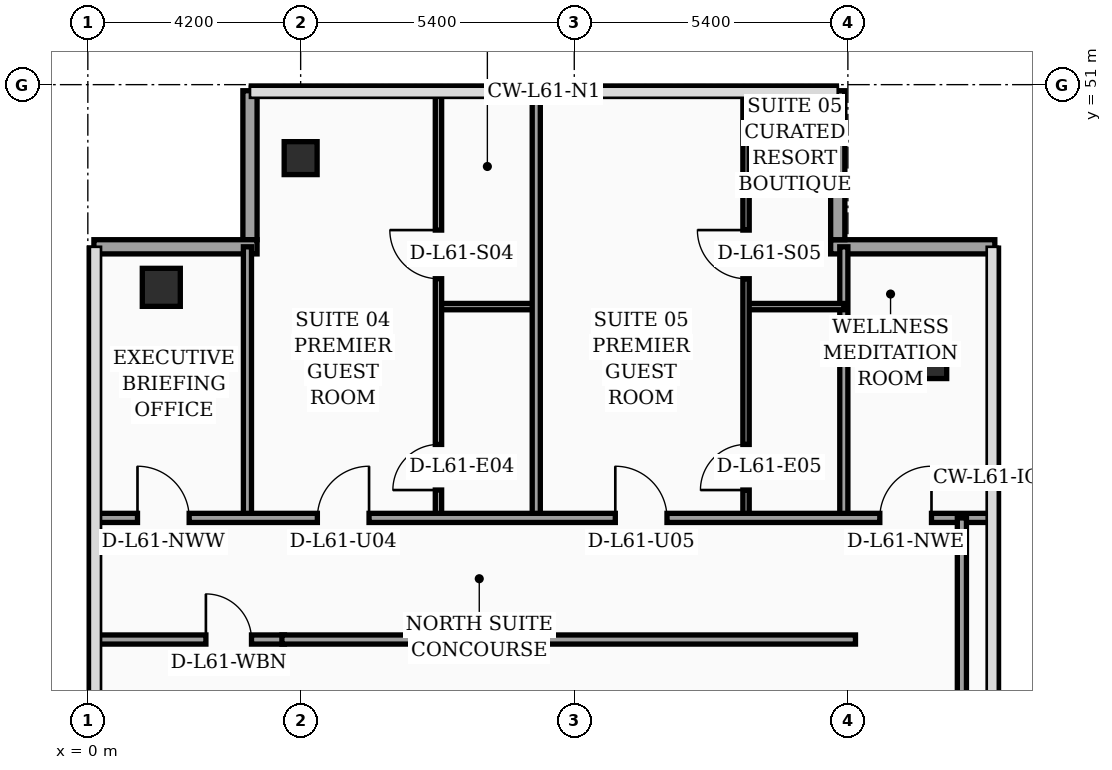
"""IFC4 building model, lengths in metres.
Left out: names, types, materials, properties, quantities, classifications, styles, units other than length and angle.
Written with IfcOpenShell. Run it as: python <this file> out.ifc"""

import sys

from ifc_helpers import new_model, si_unit, direction, frame, frame_2d, origin, origin_2d, place, context, subcontext, project, spatial, rectangle, hollow_rectangle, extrude, element, fill, save


model = new_model("IFC4")
c1 = context("Model", 3, precision=1e-05, world=origin(), true_north=direction((0.0, 1.0)))
c2 = subcontext(c1, "Body", "Model", "MODEL_VIEW")
j1 = project(units=[si_unit("LENGTHUNIT", "METRE"), si_unit("PLANEANGLEUNIT", "RADIAN")], contexts=[c1])
p1 = place(None, origin())
s1 = spatial("IfcSite", under=j1, at=p1, CompositionType="ELEMENT")
p2 = place(p1, origin())
s2 = spatial("IfcBuilding", under=s1, at=p2, CompositionType="ELEMENT")
p3 = place(p2, frame((0.0, 0.0, 247.6)))
s3 = spatial("IfcBuildingStorey", under=s2, at=p3, CompositionType="ELEMENT", Elevation=247.6)
p4 = place(p3, frame((1.45, 47.0, 0.0), z_axis=(0.0, 0.0, 1.0), x_axis=(1.0, 0.0, 0.0)))
e1 = element("IfcColumn", 1, at=p4, inside=s3, PredefinedType="COLUMN", context=c2, shape_type="SweptSolid", body=[
    extrude(hollow_rectangle(XDim=0.75, YDim=0.75, WallThickness=0.032, at=origin_2d()), origin(), (0.0, 0.0, 1.0), 3.56),
])
p5 = place(p3, frame((4.2, 49.55, 0.0), z_axis=(0.0, 0.0, 1.0), x_axis=(1.0, 0.0, 0.0)))
e2 = element("IfcColumn", 2, at=p5, inside=s3, PredefinedType="COLUMN", context=c2, shape_type="SweptSolid", body=[
    extrude(hollow_rectangle(XDim=0.65, YDim=0.65, WallThickness=0.028, at=origin_2d()), origin(), (0.0, 0.0, 1.0), 3.56),
])
p6 = place(p3, frame((16.55, 45.6, 0.0), z_axis=(0.0, 0.0, 1.0), x_axis=(1.0, 0.0, 0.0)))
e3 = element("IfcColumn", 3, at=p6, inside=s3, PredefinedType="COLUMN", context=c2, shape_type="SweptSolid", body=[
    extrude(rectangle(XDim=0.8, YDim=0.8, at=origin_2d()), origin(), (0.0, 0.0, 1.0), 3.56),
])
p7 = place(p3, frame((17.9, 47.8, 0.0), z_axis=(0.0, 0.0, 1.0), x_axis=(-1.0, 0.0, 0.0)))
e4 = element("IfcWall", 4, at=p7, inside=s3, PredefinedType="SOLIDWALL", context=c2, shape_type="SweptSolid", body=[
    extrude(rectangle(XDim=3.24, YDim=0.28, at=frame_2d((1.62, 0.0))), origin(), (0.0, 0.0, 1.0), 3.56),
])
p8 = place(p3, frame((14.8, 47.94, 0.0), z_axis=(0.0, 0.0, 1.0), x_axis=(0.0, 1.0, 0.0)))
e5 = element("IfcWall", 5, at=p8, inside=s3, PredefinedType="SOLIDWALL", context=c2, shape_type="SweptSolid", body=[
    extrude(rectangle(XDim=2.94, YDim=0.28, at=frame_2d((1.47, 0.0))), origin(), (0.0, 0.0, 1.0), 3.56),
])
p9 = place(p3, frame((3.2, 50.88, 0.0), z_axis=(0.0, 0.0, 1.0), x_axis=(0.0, -1.0, 0.0)))
e6 = element("IfcWall", 6, at=p9, inside=s3, PredefinedType="SOLIDWALL", context=c2, shape_type="SweptSolid", body=[
    extrude(rectangle(XDim=2.94, YDim=0.28, at=frame_2d((1.47, 0.0))), origin(), (0.0, 0.0, 1.0), 3.09),
])
p10 = place(p3, frame((3.34, 47.8, 0.0), z_axis=(0.0, 0.0, 1.0), x_axis=(-1.0, 0.0, 0.0)))
e7 = element("IfcWall", 7, at=p10, inside=s3, PredefinedType="SOLIDWALL", context=c2, shape_type="SweptSolid", body=[
    extrude(rectangle(XDim=3.22, YDim=0.28, at=frame_2d((1.61, 0.0))), origin(), (0.0, 0.0, 1.0), 3.09),
])
p11 = place(p3, frame((0.08, 40.05, 0.0), z_axis=(0.0, 0.0, 1.0), x_axis=(1.0, 0.0, 0.0)))
e8 = element("IfcWall", 8, at=p11, inside=s3, PredefinedType="PARTITIONING", context=c2, shape_type="SweptSolid", body=[
    extrude(rectangle(XDim=3.8, YDim=0.18, at=frame_2d((1.9, 0.0))), origin(), (0.0, 0.0, 1.0), 2.99),
])
p12 = place(p11, frame((2.25, 0.0, 0.0)))
e9 = element("IfcOpeningElement", 9, at=p12, cuts=e8, PredefinedType="OPENING", context=c2, shape_type="SweptSolid", body=[
    extrude(rectangle(XDim=0.9, YDim=2.15, at=frame_2d((0.45, 1.075))), frame((0.0, 0.1, 0.0), z_axis=(0.0, -1.0, 0.0), x_axis=(1.0, 0.0, 0.0)), (0.0, 0.0, 1.0), 0.2),
])
p13 = place(p3, frame((3.15, 42.45, 0.0), z_axis=(0.0, 0.0, 1.0), x_axis=(0.0, 1.0, 0.0)))
e10 = element("IfcWall", 10, at=p13, inside=s3, PredefinedType="PARTITIONING", context=c2, shape_type="SweptSolid", body=[
    extrude(rectangle(XDim=5.35, YDim=0.16, at=frame_2d((2.675, 0.0))), origin(), (0.0, 0.0, 1.0), 3.14),
])
p14 = place(p3, frame((14.92, 42.45, 0.0), z_axis=(0.0, 0.0, 1.0), x_axis=(0.0, 1.0, 0.0)))
e11 = element("IfcWall", 11, at=p14, inside=s3, PredefinedType="PARTITIONING", context=c2, shape_type="SweptSolid", body=[
    extrude(rectangle(XDim=5.35, YDim=0.16, at=frame_2d((2.675, 0.0))), origin(), (0.0, 0.0, 1.0), 3.09),
])
p15 = place(p3, frame((6.92, 46.62, 0.0), z_axis=(0.0, 0.0, 1.0), x_axis=(1.0, 0.0, 0.0)))
e12 = element("IfcWall", 12, at=p15, inside=s3, PredefinedType="PARTITIONING", context=c2, shape_type="SweptSolid", body=[
    extrude(rectangle(XDim=1.93, YDim=0.125, at=frame_2d((0.965, 0.0))), origin(), (0.0, 0.0, 1.0), 3.56),
])
p16 = place(p3, frame((6.92, 42.45, 0.0), z_axis=(0.0, 0.0, 1.0), x_axis=(0.0, 1.0, 0.0)))
e13 = element("IfcWall", 13, at=p16, inside=s3, PredefinedType="PARTITIONING", context=c2, shape_type="SweptSolid", body=[
    extrude(rectangle(XDim=8.49, YDim=0.125, at=frame_2d((4.245, 0.0))), origin(), (0.0, 0.0, 1.0), 3.09),
])
p17 = place(p16, frame((0.55, 0.0, 0.0)))
e14 = element("IfcOpeningElement", 14, at=p17, cuts=e13, PredefinedType="OPENING", context=c2, shape_type="SweptSolid", body=[
    extrude(rectangle(XDim=0.9, YDim=2.15, at=frame_2d((0.45, 1.075))), frame((0.0, 0.073, 0.0), z_axis=(0.0, -1.0, 0.0), x_axis=(1.0, 0.0, 0.0)), (0.0, 0.0, 1.0), 0.145),
])
p18 = place(p16, frame((4.72, 0.0, 0.0)))
e15 = element("IfcOpeningElement", 15, at=p18, cuts=e13, PredefinedType="OPENING", context=c2, shape_type="SweptSolid", body=[
    extrude(rectangle(XDim=0.96, YDim=2.2, at=frame_2d((0.48, 1.1))), frame((0.0, 0.073, 0.0), z_axis=(0.0, -1.0, 0.0), x_axis=(1.0, 0.0, 0.0)), (0.0, 0.0, 1.0), 0.145),
])
p19 = place(p3, frame((12.99, 46.62, 0.0), z_axis=(0.0, 0.0, 1.0), x_axis=(1.0, 0.0, 0.0)))
e16 = element("IfcWall", 16, at=p19, inside=s3, PredefinedType="PARTITIONING", context=c2, shape_type="SweptSolid", body=[
    extrude(rectangle(XDim=1.93, YDim=0.125, at=frame_2d((0.965, 0.0))), origin(), (0.0, 0.0, 1.0), 3.09),
])
p20 = place(p3, frame((12.99, 42.45, 0.0), z_axis=(0.0, 0.0, 1.0), x_axis=(0.0, 1.0, 0.0)))
e17 = element("IfcWall", 17, at=p20, inside=s3, PredefinedType="PARTITIONING", context=c2, shape_type="SweptSolid", body=[
    extrude(rectangle(XDim=8.49, YDim=0.125, at=frame_2d((4.245, 0.0))), origin(), (0.0, 0.0, 1.0), 3.09),
])
p21 = place(p20, frame((0.55, 0.0, 0.0)))
e18 = element("IfcOpeningElement", 18, at=p21, cuts=e17, PredefinedType="OPENING", context=c2, shape_type="SweptSolid", body=[
    extrude(rectangle(XDim=0.9, YDim=2.15, at=frame_2d((0.45, 1.075))), frame((0.0, 0.073, 0.0), z_axis=(0.0, -1.0, 0.0), x_axis=(1.0, 0.0, 0.0)), (0.0, 0.0, 1.0), 0.145),
])
p22 = place(p20, frame((4.72, 0.0, 0.0)))
e19 = element("IfcOpeningElement", 19, at=p22, cuts=e17, PredefinedType="OPENING", context=c2, shape_type="SweptSolid", body=[
    extrude(rectangle(XDim=0.96, YDim=2.2, at=frame_2d((0.48, 1.1))), frame((0.0, 0.073, 0.0), z_axis=(0.0, -1.0, 0.0), x_axis=(1.0, 0.0, 0.0)), (0.0, 0.0, 1.0), 0.145),
])
p23 = place(p3, frame((8.85, 42.45, 0.0), z_axis=(0.0, 0.0, 1.0), x_axis=(0.0, 1.0, 0.0)))
e20 = element("IfcWall", 20, at=p23, inside=s3, PredefinedType="PARTITIONING", context=c2, shape_type="SweptSolid", body=[
    extrude(rectangle(XDim=8.49, YDim=0.16, at=frame_2d((4.245, 0.0))), origin(), (0.0, 0.0, 1.0), 3.09),
])
p24 = place(p3, frame((0.08, 42.45, 0.0), z_axis=(0.0, 0.0, 1.0), x_axis=(1.0, 0.0, 0.0)))
e21 = element("IfcWall", 21, at=p24, inside=s3, PredefinedType="PARTITIONING", context=c2, shape_type="SweptSolid", body=[
    extrude(rectangle(XDim=17.77, YDim=0.18, at=frame_2d((8.885, 0.0))), origin(), (0.0, 0.0, 1.0), 2.99),
])
p25 = place(p24, frame((0.9, 0.0, 0.0)))
e22 = element("IfcOpeningElement", 22, at=p25, cuts=e21, PredefinedType="OPENING", context=c2, shape_type="SweptSolid", body=[
    extrude(rectangle(XDim=1.02, YDim=2.2, at=frame_2d((0.51, 1.1))), frame((0.0, 0.1, 0.0), z_axis=(0.0, -1.0, 0.0), x_axis=(1.0, 0.0, 0.0)), (0.0, 0.0, 1.0), 0.2),
])
p26 = place(p24, frame((4.45, 0.0, 0.0)))
e23 = element("IfcOpeningElement", 23, at=p26, cuts=e21, PredefinedType="OPENING", context=c2, shape_type="SweptSolid", body=[
    extrude(rectangle(XDim=1.02, YDim=2.2, at=frame_2d((0.51, 1.1))), frame((0.0, 0.1, 0.0), z_axis=(0.0, -1.0, 0.0), x_axis=(1.0, 0.0, 0.0)), (0.0, 0.0, 1.0), 0.2),
])
p27 = place(p24, frame((10.33, 0.0, 0.0)))
e24 = element("IfcOpeningElement", 24, at=p27, cuts=e21, PredefinedType="OPENING", context=c2, shape_type="SweptSolid", body=[
    extrude(rectangle(XDim=1.02, YDim=2.2, at=frame_2d((0.51, 1.1))), frame((0.0, 0.1, 0.0), z_axis=(0.0, -1.0, 0.0), x_axis=(1.0, 0.0, 0.0)), (0.0, 0.0, 1.0), 0.2),
])
p28 = place(p24, frame((15.55, 0.0, 0.0)))
e25 = element("IfcOpeningElement", 25, at=p28, cuts=e21, PredefinedType="OPENING", context=c2, shape_type="SweptSolid", body=[
    extrude(rectangle(XDim=1.02, YDim=2.2, at=frame_2d((0.51, 1.1))), frame((0.0, 0.1, 0.0), z_axis=(0.0, -1.0, 0.0), x_axis=(1.0, 0.0, 0.0)), (0.0, 0.0, 1.0), 0.2),
])
p29 = place(p3, frame((17.25, 24.3, 0.0), z_axis=(0.0, 0.0, 1.0), x_axis=(0.0, 1.0, 0.0)))
e26 = element("IfcWall", 26, at=p29, inside=s3, PredefinedType="PARTITIONING", context=c2, shape_type="SweptSolid", body=[
    extrude(rectangle(XDim=18.15, YDim=0.18, at=frame_2d((9.075, 0.0))), origin(), (0.0, 0.0, 1.0), 2.99),
])
p30 = place(p29, frame((3.2, 0.0, 0.0)))
e27 = element("IfcOpeningElement", 27, at=p30, cuts=e26, PredefinedType="OPENING", context=c2, shape_type="SweptSolid", body=[
    extrude(rectangle(XDim=1.02, YDim=2.2, at=frame_2d((0.51, 1.1))), frame((0.0, 0.1, 0.0), z_axis=(0.0, -1.0, 0.0), x_axis=(1.0, 0.0, 0.0)), (0.0, 0.0, 1.0), 0.2),
])
p31 = place(p3, frame((3.83, 40.05, 0.0), z_axis=(0.0, 0.0, 1.0), x_axis=(1.0, 0.0, 0.0)))
e28 = element("IfcWall", 28, at=p31, inside=s3, PredefinedType="PARTITIONING", context=c2, shape_type="SweptSolid", body=[
    extrude(rectangle(XDim=11.32, YDim=0.18, at=frame_2d((5.66, 0.0))), origin(), (0.0, 0.0, 1.0), 2.99),
])
p32 = place(p12, origin())
e29 = element("IfcDoor", 29, at=p32, inside=s3, OperationType="SINGLE_SWING_LEFT", PredefinedType="DOOR", context=c2, shape_type="SweptSolid", body=[
    extrude(rectangle(XDim=0.9, YDim=2.15, at=frame_2d((0.45, 1.075))), frame((0.0, 0.025, 0.0), z_axis=(0.0, -1.0, 0.0), x_axis=(1.0, 0.0, 0.0)), (0.0, 0.0, 1.0), 0.05),
])
fill(e9, e29)
p33 = place(p17, origin())
e30 = element("IfcDoor", 30, at=p33, inside=s3, OperationType="SINGLE_SWING_LEFT", PredefinedType="DOOR", context=c2, shape_type="SweptSolid", body=[
    extrude(rectangle(XDim=0.9, YDim=2.15, at=frame_2d((0.45, 1.075))), frame((0.0, 0.025, 0.0), z_axis=(0.0, -1.0, 0.0), x_axis=(1.0, 0.0, 0.0)), (0.0, 0.0, 1.0), 0.05),
])
fill(e14, e30)
p34 = place(p18, origin())
e31 = element("IfcDoor", 31, at=p34, inside=s3, OperationType="SINGLE_SWING_RIGHT", PredefinedType="DOOR", context=c2, shape_type="SweptSolid", body=[
    extrude(rectangle(XDim=0.96, YDim=2.2, at=frame_2d((0.48, 1.1))), frame((0.0, 0.025, 0.0), z_axis=(0.0, -1.0, 0.0), x_axis=(1.0, 0.0, 0.0)), (0.0, 0.0, 1.0), 0.05),
])
fill(e15, e31)
p35 = place(p21, origin())
e32 = element("IfcDoor", 32, at=p35, inside=s3, OperationType="SINGLE_SWING_LEFT", PredefinedType="DOOR", context=c2, shape_type="SweptSolid", body=[
    extrude(rectangle(XDim=0.9, YDim=2.15, at=frame_2d((0.45, 1.075))), frame((0.0, 0.025, 0.0), z_axis=(0.0, -1.0, 0.0), x_axis=(1.0, 0.0, 0.0)), (0.0, 0.0, 1.0), 0.05),
])
fill(e18, e32)
p36 = place(p22, origin())
e33 = element("IfcDoor", 33, at=p36, inside=s3, OperationType="SINGLE_SWING_RIGHT", PredefinedType="DOOR", context=c2, shape_type="SweptSolid", body=[
    extrude(rectangle(XDim=0.96, YDim=2.2, at=frame_2d((0.48, 1.1))), frame((0.0, 0.025, 0.0), z_axis=(0.0, -1.0, 0.0), x_axis=(1.0, 0.0, 0.0)), (0.0, 0.0, 1.0), 0.05),
])
fill(e19, e33)
p37 = place(p25, origin())
e34 = element("IfcDoor", 34, at=p37, inside=s3, OperationType="SINGLE_SWING_LEFT", PredefinedType="DOOR", context=c2, shape_type="SweptSolid", body=[
    extrude(rectangle(XDim=1.02, YDim=2.2, at=frame_2d((0.51, 1.1))), frame((0.0, 0.025, 0.0), z_axis=(0.0, -1.0, 0.0), x_axis=(1.0, 0.0, 0.0)), (0.0, 0.0, 1.0), 0.05),
])
fill(e22, e34)
p38 = place(p26, origin())
e35 = element("IfcDoor", 35, at=p38, inside=s3, OperationType="SINGLE_SWING_RIGHT", PredefinedType="DOOR", context=c2, shape_type="SweptSolid", body=[
    extrude(rectangle(XDim=1.02, YDim=2.2, at=frame_2d((0.51, 1.1))), frame((0.0, 0.025, 0.0), z_axis=(0.0, -1.0, 0.0), x_axis=(1.0, 0.0, 0.0)), (0.0, 0.0, 1.0), 0.05),
])
fill(e23, e35)
p39 = place(p27, origin())
e36 = element("IfcDoor", 36, at=p39, inside=s3, OperationType="SINGLE_SWING_LEFT", PredefinedType="DOOR", context=c2, shape_type="SweptSolid", body=[
    extrude(rectangle(XDim=1.02, YDim=2.2, at=frame_2d((0.51, 1.1))), frame((0.0, 0.025, 0.0), z_axis=(0.0, -1.0, 0.0), x_axis=(1.0, 0.0, 0.0)), (0.0, 0.0, 1.0), 0.05),
])
fill(e24, e36)
p40 = place(p28, origin())
e37 = element("IfcDoor", 37, at=p40, inside=s3, OperationType="SINGLE_SWING_RIGHT", PredefinedType="DOOR", context=c2, shape_type="SweptSolid", body=[
    extrude(rectangle(XDim=1.02, YDim=2.2, at=frame_2d((0.51, 1.1))), frame((0.0, 0.025, 0.0), z_axis=(0.0, -1.0, 0.0), x_axis=(1.0, 0.0, 0.0)), (0.0, 0.0, 1.0), 0.05),
])
fill(e25, e37)
save(model, sys.argv[1])
